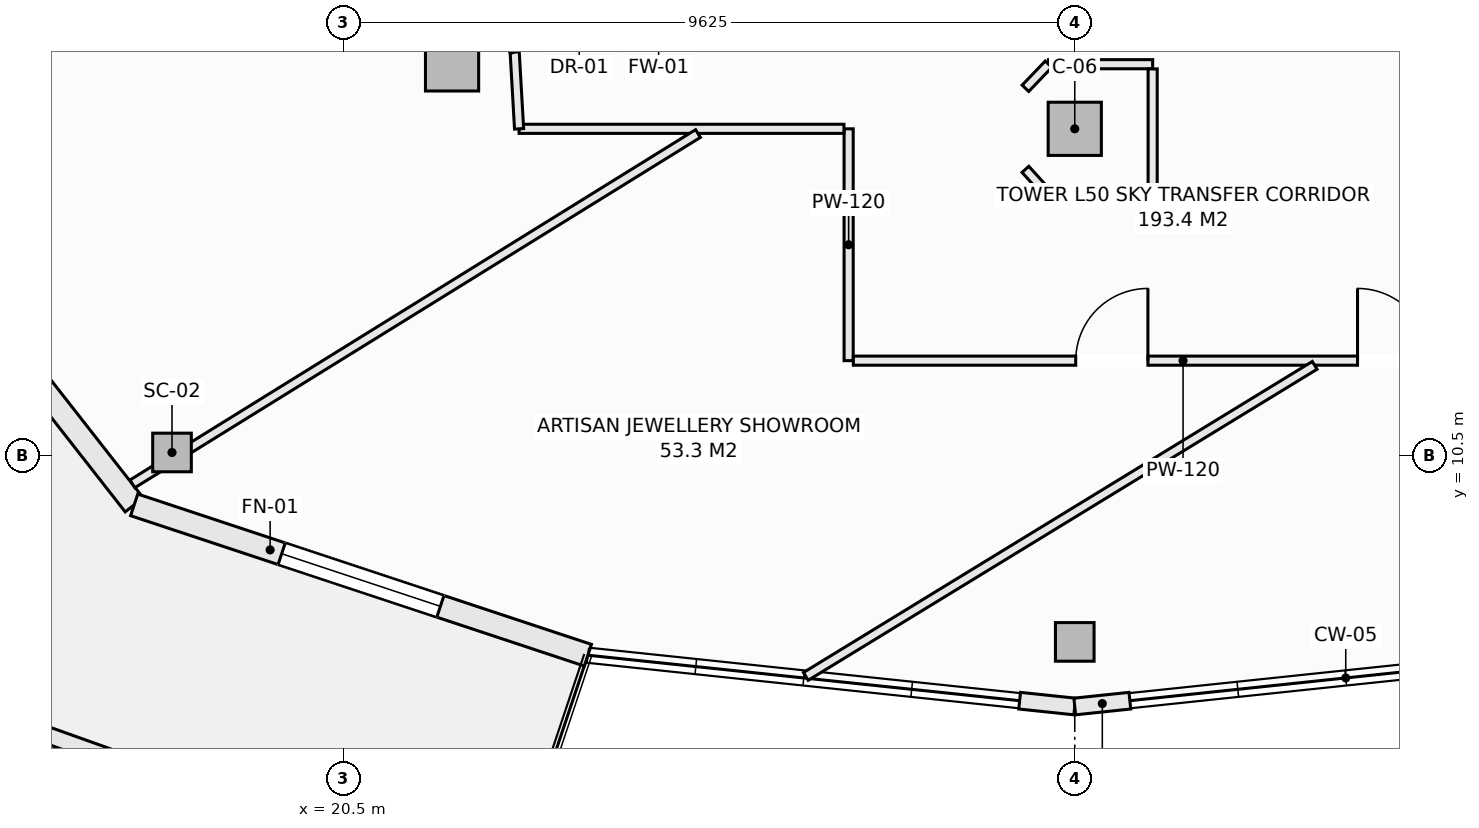
"""IFC4 building model, lengths in metres.
Left out: names, types, materials, properties, quantities, classifications, styles, units other than length and angle.
Written with IfcOpenShell. Run it as: python <this file> out.ifc"""

import sys

from ifc_helpers import new_model, si_unit, direction, frame, frame_2d, origin, origin_2d, place, context, subcontext, project, spatial, rectangle, hollow_rectangle, extrude, element, fill, save


model = new_model("IFC4")
c1 = context("Model", 3, precision=1e-05, world=origin(), true_north=direction((0.0, 1.0)))
c2 = subcontext(c1, "Body", "Model", "MODEL_VIEW")
j1 = project(units=[si_unit("LENGTHUNIT", "METRE"), si_unit("PLANEANGLEUNIT", "RADIAN")], contexts=[c1])
p1 = place(None, origin())
s1 = spatial("IfcSite", under=j1, at=p1, CompositionType="ELEMENT")
p2 = place(p1, origin())
s2 = spatial("IfcBuilding", under=s1, at=p2, CompositionType="ELEMENT")
p3 = place(p2, frame((0.0, 0.0, 191.9)))
s3 = spatial("IfcBuildingStorey", under=s2, at=p3, CompositionType="ELEMENT", Elevation=191.9)
for number, where, z_axis, x_axis in (
    (1, (18.247, 10.542, -0.28), (0.0, 0.0, 1.0), (1.0, 0.0, 0.0)),
    (2, (30.125, 8.05, -0.28), (0.0, 0.0, 1.0), (1.0, 0.0, 0.0)),
):
    element("IfcColumn", number, at=place(p3, frame(where, z_axis=z_axis, x_axis=x_axis)), inside=s3, PredefinedType="COLUMN", context=c2, shape_type="SweptSolid", body=[
        extrude(hollow_rectangle(XDim=0.508, YDim=0.508, WallThickness=0.019, at=origin_2d()), origin(), (0.0, 0.0, 1.0), 4.51),
    ])
for number, where, z_axis, x_axis in (
    (3, (21.932, 15.648, -0.28), (0.0, 0.0, 1.0), (1.0, 0.0, 0.0)),
    (4, (30.125, 14.8, -0.28), (0.0, 0.0, 1.0), (1.0, 0.0, 0.0)),
):
    element("IfcColumn", number, at=place(p3, frame(where, z_axis=z_axis, x_axis=x_axis)), inside=s3, PredefinedType="COLUMN", context=c2, shape_type="SweptSolid", body=[
        extrude(rectangle(XDim=0.7, YDim=0.7, at=origin_2d()), origin(), (0.0, 0.0, 1.0), 4.51),
    ])
p4 = place(p3, frame((14.117, 14.493, 0.0), z_axis=(0.0, 0.0, 1.0), x_axis=(0.616450126935, -0.787393955401, 0.0)))
e5 = element("IfcWall", 5, at=p4, inside=s3, PredefinedType="SOLIDWALL", context=c2, shape_type="SweptSolid", body=[
    extrude(rectangle(XDim=5.893, YDim=0.3, at=frame_2d((2.946, 0.0))), origin(), (0.0, 0.0, 1.0), 3.805),
])
p5 = place(p4, frame((2.046, 0.0, 0.0)))
e6 = element("IfcOpeningElement", 6, at=p5, cuts=e5, PredefinedType="OPENING", context=c2, shape_type="SweptSolid", body=[
    extrude(rectangle(XDim=1.8, YDim=2.25, at=frame_2d((0.9, 1.125))), frame((0.0, 0.16, 0.0), z_axis=(0.0, -1.0, 0.0), x_axis=(1.0, 0.0, 0.0)), (0.0, 0.0, 1.0), 0.32),
])
p6 = place(p3, frame((17.75, 9.853, 0.0), z_axis=(0.0, 0.0, 1.0), x_axis=(0.949240877604, -0.314550085495, 0.0)))
e7 = element("IfcWall", 7, at=p6, inside=s3, PredefinedType="SOLIDWALL", context=c2, shape_type="SweptSolid", body=[
    extrude(rectangle(XDim=6.288, YDim=0.3, at=frame_2d((3.144, 0.0))), origin(), (0.0, 0.0, 1.0), 3.805),
])
p7 = place(p6, frame((2.044, 0.0, 0.72)))
e8 = element("IfcOpeningElement", 8, at=p7, cuts=e7, PredefinedType="OPENING", context=c2, shape_type="SweptSolid", body=[
    extrude(rectangle(XDim=2.2, YDim=1.65, at=frame_2d((1.1, 0.825))), frame((0.0, 0.16, 0.0), z_axis=(0.0, -1.0, 0.0), x_axis=(1.0, 0.0, 0.0)), (0.0, 0.0, 1.0), 0.32),
])
for number, where, z_axis, x_axis in (
    (9, (29.4, 7.276, 0.0), (0.0, 0.0, 1.0), (0.994, -0.105, 0.0)),
    (10, (30.125, 7.2, 0.0), (0.0, 0.0, 1.0), (0.994, 0.105, 0.0)),
):
    element("IfcWall", number, at=place(p3, frame(where, z_axis=z_axis, x_axis=x_axis)), inside=s3, PredefinedType="SOLIDWALL", context=c2, shape_type="SweptSolid", body=[
        extrude(rectangle(XDim=0.729, YDim=0.22, at=frame_2d((0.365, 0.0))), origin(), (0.0, 0.0, 1.0), 3.805),
    ])
p8 = place(p3, frame((15.737, 7.134, 0.0), z_axis=(0.0, 0.0, 1.0), x_axis=(0.941780086523, -0.336229488042, 0.0)))
e11 = element("IfcWall", 11, at=p8, inside=s3, PredefinedType="PARAPET", context=c2, shape_type="SweptSolid", body=[
    extrude(rectangle(XDim=7.378, YDim=0.22, at=frame_2d((3.689, 0.0))), origin(), (0.0, 0.0, 1.0), 0.52),
])
p9 = place(p3, frame((27.15, 11.75, 0.0), z_axis=(0.0, 0.0, 1.0), x_axis=(0.0, 1.0, 0.0)))
e12 = element("IfcWall", 12, at=p9, inside=s3, PredefinedType="PARTITIONING", context=c2, shape_type="SweptSolid", body=[
    extrude(rectangle(XDim=3.05, YDim=0.12, at=frame_2d((1.525, 0.0))), origin(), (0.0, 0.0, 1.0), 4.23),
])
p10 = place(p3, frame((29.78, 15.65, 0.0), z_axis=(0.0, 0.0, 1.0), x_axis=(1.0, 0.0, 0.0)))
e13 = element("IfcWall", 13, at=p10, inside=s3, PredefinedType="PARTITIONING", context=c2, shape_type="SweptSolid", body=[
    extrude(rectangle(XDim=1.37, YDim=0.12, at=frame_2d((0.685, 0.0))), origin(), (0.0, 0.0, 1.0), 4.23),
])
p11 = place(p3, frame((27.212, 11.75, 0.0), z_axis=(0.0, 0.0, 1.0), x_axis=(1.0, 0.0, 0.0)))
e14 = element("IfcWall", 14, at=p11, inside=s3, PredefinedType="PARTITIONING", context=c2, shape_type="SweptSolid", body=[
    extrude(rectangle(XDim=8.676, YDim=0.12, at=frame_2d((4.338, 0.0))), origin(), (0.0, 0.0, 1.0), 4.23),
])
p12 = place(p11, frame((2.926, 0.0, 0.0)))
e15 = element("IfcOpeningElement", 15, at=p12, cuts=e14, PredefinedType="OPENING", context=c2, shape_type="SweptSolid", body=[
    extrude(rectangle(XDim=0.95, YDim=2.1, at=frame_2d((0.475, 1.05))), frame((0.0, 0.07, 0.0), z_axis=(0.0, -1.0, 0.0), x_axis=(1.0, 0.0, 0.0)), (0.0, 0.0, 1.0), 0.14),
])
p13 = place(p11, frame((6.633, 0.0, 0.0)))
e16 = element("IfcOpeningElement", 16, at=p13, cuts=e14, PredefinedType="OPENING", context=c2, shape_type="SweptSolid", body=[
    extrude(rectangle(XDim=0.95, YDim=2.1, at=frame_2d((0.475, 1.05))), frame((0.0, 0.07, 0.0), z_axis=(0.0, -1.0, 0.0), x_axis=(1.0, 0.0, 0.0)), (0.0, 0.0, 1.0), 0.14),
])
p14 = place(p3, frame((22.814, 14.8, 0.0), z_axis=(0.0, 0.0, 1.0), x_axis=(1.0, 0.0, 0.0)))
e17 = element("IfcWall", 17, at=p14, inside=s3, PredefinedType="PARTITIONING", context=c2, shape_type="SweptSolid", body=[
    extrude(rectangle(XDim=4.274, YDim=0.12, at=frame_2d((2.137, 0.0))), origin(), (0.0, 0.0, 1.0), 4.23),
])
p15 = place(p3, frame((22.756, 15.811, 0.0), z_axis=(0.0, 0.0, 1.0), x_axis=(0.057139047697, -0.998366230012, 0.0)))
e18 = element("IfcWall", 18, at=p15, inside=s3, PredefinedType="PARTITIONING", context=c2, shape_type="SweptSolid", body=[
    extrude(rectangle(XDim=1.013, YDim=0.12, at=frame_2d((0.506, 0.0))), origin(), (0.0, 0.0, 1.0), 4.23),
])
p16 = place(p3, frame((22.353, 16.958, 0.0), z_axis=(0.0, 0.0, 1.0), x_axis=(0.331370038458, -0.943500873138, 0.0)))
e19 = element("IfcWall", 19, at=p16, inside=s3, PredefinedType="PARTITIONING", context=c2, shape_type="SweptSolid", body=[
    extrude(rectangle(XDim=1.216, YDim=0.12, at=frame_2d((0.608, 0.0))), origin(), (0.0, 0.0, 1.0), 4.23),
])
p17 = place(p3, frame((29.476, 15.333, 0.0), z_axis=(0.0, 0.0, 1.0), x_axis=(0.692219273951, 0.721687243043, 0.0)))
e20 = element("IfcWall", 20, at=p17, inside=s3, PredefinedType="PARTITIONING", context=c2, shape_type="SweptSolid", body=[
    extrude(rectangle(XDim=0.439, YDim=0.12, at=frame_2d((0.22, 0.0))), origin(), (0.0, 0.0, 1.0), 4.23),
])
p18 = place(p3, frame((29.476, 14.267, 0.0), z_axis=(0.0, 0.0, 1.0), x_axis=(0.670659392016, -0.741765448037, 0.0)))
e21 = element("IfcWall", 21, at=p18, inside=s3, PredefinedType="PARTITIONING", context=c2, shape_type="SweptSolid", body=[
    extrude(rectangle(XDim=0.453, YDim=0.12, at=frame_2d((0.227, 0.0))), origin(), (0.0, 0.0, 1.0), 4.23),
])
p19 = place(p3, frame((29.78, 13.85, 0.0), z_axis=(0.0, 0.0, 1.0), x_axis=(1.0, 0.0, 0.0)))
e22 = element("IfcWall", 22, at=p19, inside=s3, PredefinedType="PARTITIONING", context=c2, shape_type="SweptSolid", body=[
    extrude(rectangle(XDim=1.37, YDim=0.12, at=frame_2d((0.685, 0.0))), origin(), (0.0, 0.0, 1.0), 4.23),
])
p20 = place(p3, frame((31.15, 13.912, 0.0), z_axis=(0.0, 0.0, 1.0), x_axis=(0.0, 1.0, 0.0)))
e23 = element("IfcWall", 23, at=p20, inside=s3, PredefinedType="PARTITIONING", context=c2, shape_type="SweptSolid", body=[
    extrude(rectangle(XDim=1.676, YDim=0.12, at=frame_2d((0.838, 0.0))), origin(), (0.0, 0.0, 1.0), 4.23),
])
p21 = place(p3, frame((17.727, 10.129, 0.0), z_axis=(0.0, 0.0, 1.0), x_axis=(0.850147430438, 0.526544724141, 0.0)))
e24 = element("IfcWall", 24, at=p21, inside=s3, PredefinedType="PARTITIONING", context=c2, shape_type="SweptSolid", body=[
    extrude(rectangle(XDim=8.753, YDim=0.12, at=frame_2d((4.376, 0.0))), origin(), (0.0, 0.0, 1.0), 3.678),
])
p22 = place(p3, frame((26.586, 7.596, 0.0), z_axis=(0.0, 0.0, 1.0), x_axis=(0.853233376363, 0.52152929492, 0.0)))
e25 = element("IfcWall", 25, at=p22, inside=s3, PredefinedType="PARTITIONING", context=c2, shape_type="SweptSolid", body=[
    extrude(rectangle(XDim=7.847, YDim=0.12, at=frame_2d((3.923, 0.0))), origin(), (0.0, 0.0, 1.0), 4.23),
])
p23 = place(p7, origin())
e26 = element("IfcWindow", 26, at=p23, inside=s3, PartitioningType="SINGLE_PANEL", PredefinedType="WINDOW", context=c2, shape_type="SweptSolid", body=[
    extrude(rectangle(XDim=2.2, YDim=1.65, at=frame_2d((1.1, 0.825))), frame((0.0, 0.03, 0.0), z_axis=(0.0, -1.0, 0.0), x_axis=(1.0, 0.0, 0.0)), (0.0, 0.0, 1.0), 0.06),
])
fill(e8, e26)
p24 = place(p12, origin())
e27 = element("IfcDoor", 27, at=p24, inside=s3, OperationType="SINGLE_SWING_RIGHT", PredefinedType="DOOR", context=c2, shape_type="SweptSolid", body=[
    extrude(rectangle(XDim=0.95, YDim=2.1, at=frame_2d((0.475, 1.05))), frame((0.0, 0.025, 0.0), z_axis=(0.0, -1.0, 0.0), x_axis=(1.0, 0.0, 0.0)), (0.0, 0.0, 1.0), 0.05),
])
fill(e15, e27)
p25 = place(p13, origin())
e28 = element("IfcDoor", 28, at=p25, inside=s3, OperationType="SINGLE_SWING_LEFT", PredefinedType="DOOR", context=c2, shape_type="SweptSolid", body=[
    extrude(rectangle(XDim=0.95, YDim=2.1, at=frame_2d((0.475, 1.05))), frame((0.0, 0.025, 0.0), z_axis=(0.0, -1.0, 0.0), x_axis=(1.0, 0.0, 0.0)), (0.0, 0.0, 1.0), 0.05),
])
fill(e16, e28)
save(model, sys.argv[1])
